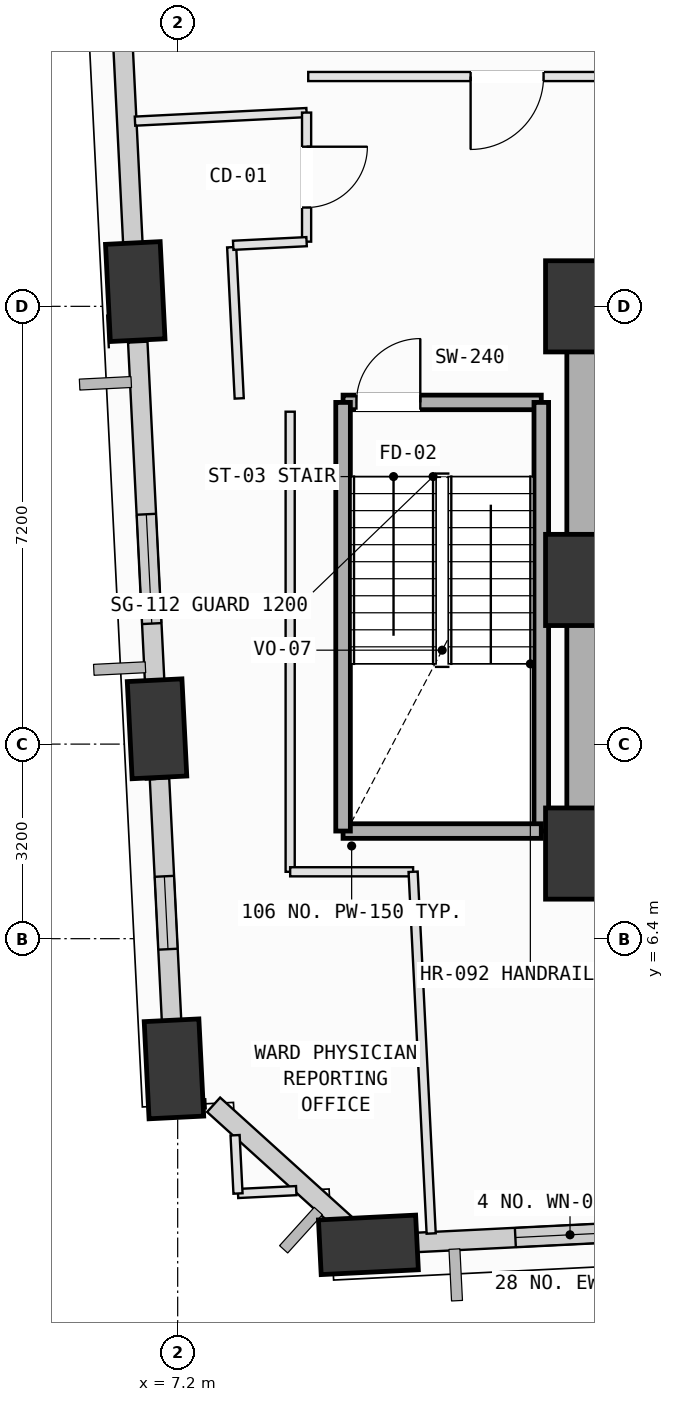
"""IFC4 building model, lengths in metres.
Left out: names, types, materials, properties, quantities, classifications, styles, units other than length and angle.
Written with IfcOpenShell. Run it as: python <this file> out.ifc"""

import sys

from ifc_helpers import new_model, si_unit, direction, frame, frame_2d, origin, origin_2d, place, context, subcontext, project, spatial, rectangle, extrude, element, fill, save


model = new_model("IFC4")
c1 = context("Model", 3, precision=1e-05, world=origin(), true_north=direction((0.0, 1.0)))
c2 = subcontext(c1, "Body", "Model", "MODEL_VIEW")
j1 = project(units=[si_unit("LENGTHUNIT", "METRE"), si_unit("PLANEANGLEUNIT", "RADIAN")], contexts=[c1])
p1 = place(None, origin())
s1 = spatial("IfcSite", under=j1, at=p1, CompositionType="ELEMENT")
p2 = place(p1, origin())
s2 = spatial("IfcBuilding", under=s1, at=p2, CompositionType="ELEMENT")
p3 = place(p2, frame((0.0, 0.0, 35.0)))
s3 = spatial("IfcBuildingStorey", under=s2, at=p3, CompositionType="ELEMENT", Elevation=35.0)
for number, where, z_axis, x_axis in (
    (1, (14.0, 7.8, 0.0), (0.0, 0.0, 1.0), (1.0, 0.0, 0.0)),
    (2, (14.0, 12.3, 0.0), (0.0, 0.0, 1.0), (1.0, 0.0, 0.0)),
    (3, (14.0, 16.8, 0.0), (0.0, 0.0, 1.0), (1.0, 0.0, 0.0)),
):
    element("IfcColumn", number, at=place(p3, frame(where, z_axis=z_axis, x_axis=x_axis)), inside=s3, PredefinedType="COLUMN", context=c2, shape_type="SweptSolid", body=[
        extrude(rectangle(XDim=1.5, YDim=1.5, at=origin_2d()), origin(), (0.0, 0.0, 1.0), 4.0),
    ])
p4 = place(p3, frame((10.337, 1.364, 0.002), z_axis=(0.097018175164, -0.094778828638, 0.990759530527), x_axis=(0.662701179656, 0.748853569612, 0.00674372016)))
e4 = element("IfcColumn", 4, at=p4, inside=s3, PredefinedType="COLUMN", context=c2, shape_type="SweptSolid", body=[
    extrude(rectangle(XDim=1.6, YDim=0.9, at=origin_2d()), origin(), (0.0, 0.0, 1.0), 4.034),
])
p5 = place(p3, frame((6.502, 17.043, 0.002), z_axis=(0.032885474542, -0.111337353845, 0.993238410052), x_axis=(-0.328691117165, 0.937292914665, 0.11594887501)))
e5 = element("IfcColumn", 5, at=p5, inside=s3, PredefinedType="COLUMN", context=c2, shape_type="SweptSolid", body=[
    extrude(rectangle(XDim=1.6, YDim=0.9, at=origin_2d()), origin(), (0.0, 0.0, 1.0), 4.024),
])
p6 = place(p3, frame((6.86, 9.852, 0.002), z_axis=(0.062358210805, -0.109445023046, 0.992034898819), x_axis=(-0.533701082068, 0.836262890195, 0.125807525543)))
e6 = element("IfcColumn", 6, at=p6, inside=s3, PredefinedType="COLUMN", context=c2, shape_type="SweptSolid", body=[
    extrude(rectangle(XDim=1.6, YDim=0.9, at=origin_2d()), origin(), (0.0, 0.0, 1.0), 4.029),
])
p7 = place(p3, frame((7.139, 4.259, 0.002), z_axis=(0.085253947103, -0.107943961413, 0.990494758036), x_axis=(-0.652169766377, 0.745520781844, 0.13738034671)))
e7 = element("IfcColumn", 7, at=p7, inside=s3, PredefinedType="COLUMN", context=c2, shape_type="SweptSolid", body=[
    extrude(rectangle(XDim=1.6, YDim=0.9, at=origin_2d()), origin(), (0.0, 0.0, 1.0), 4.035),
])
p8 = place(p3, frame((17.122, 1.702, 0.0), z_axis=(0.0, 0.0, 1.0), x_axis=(-0.998763010787, -0.049723719528, 0.0)))
e8 = element("IfcWall", 8, at=p8, inside=s3, PredefinedType="SOLIDWALL", context=c2, shape_type="SweptSolid", body=[
    extrude(rectangle(XDim=6.034, YDim=0.32, at=frame_2d((3.017, 0.0))), origin(), (0.0, 0.0, 1.0), 3.165),
])
p9 = place(p8, frame((2.574, 0.0, 0.75)))
e9 = element("IfcOpeningElement", 9, at=p9, cuts=e8, PredefinedType="OPENING", context=c2, shape_type="SweptSolid", body=[
    extrude(rectangle(XDim=1.8, YDim=2.05, at=frame_2d((0.9, 1.025))), frame((0.0, 0.17, 0.0), z_axis=(0.0, -1.0, 0.0), x_axis=(1.0, 0.0, 0.0)), (0.0, 0.0, 1.0), 0.34),
])
p10 = place(p3, frame((6.483, 17.421, 0.0), z_axis=(0.0, 0.0, 1.0), x_axis=(-0.049743098397, 0.998762045816, 0.0)))
e10 = element("IfcWall", 10, at=p10, inside=s3, PredefinedType="SOLIDWALL", context=c2, shape_type="SweptSolid", body=[
    extrude(rectangle(XDim=7.136, YDim=0.32, at=frame_2d((3.568, 0.0))), origin(), (0.0, 0.0, 1.0), 3.165),
])
p11 = place(p10, frame((4.264, 0.0, 0.75)))
e11 = element("IfcOpeningElement", 11, at=p11, cuts=e10, PredefinedType="OPENING", context=c2, shape_type="SweptSolid", body=[
    extrude(rectangle(XDim=1.4, YDim=1.85, at=frame_2d((0.7, 0.925))), frame((0.0, 0.17, 0.0), z_axis=(0.0, -1.0, 0.0), x_axis=(1.0, 0.0, 0.0)), (0.0, 0.0, 1.0), 0.34),
])
p12 = place(p3, frame((6.842, 10.222, 0.0), z_axis=(0.0, 0.0, 1.0), x_axis=(-0.049706150809, 0.998763885296, 0.0)))
e12 = element("IfcWall", 12, at=p12, inside=s3, PredefinedType="SOLIDWALL", context=c2, shape_type="SweptSolid", body=[
    extrude(rectangle(XDim=5.997, YDim=0.32, at=frame_2d((2.999, 0.0))), origin(), (0.0, 0.0, 1.0), 3.165),
])
p13 = place(p12, frame((1.362, 0.0, 0.75)))
e13 = element("IfcOpeningElement", 13, at=p13, cuts=e12, PredefinedType="OPENING", context=c2, shape_type="SweptSolid", body=[
    extrude(rectangle(XDim=1.8, YDim=2.05, at=frame_2d((0.9, 1.025))), frame((0.0, 0.17, 0.0), z_axis=(0.0, -1.0, 0.0), x_axis=(1.0, 0.0, 0.0)), (0.0, 0.0, 1.0), 0.34),
])
p14 = place(p3, frame((7.121, 4.618, 0.0), z_axis=(0.0, 0.0, 1.0), x_axis=(-0.04969774224, 0.998764303735, 0.0)))
e14 = element("IfcWall", 14, at=p14, inside=s3, PredefinedType="SOLIDWALL", context=c2, shape_type="SweptSolid", body=[
    extrude(rectangle(XDim=4.416, YDim=0.32, at=frame_2d((2.208, 0.0))), origin(), (0.0, 0.0, 1.0), 3.165),
])
p15 = place(p14, frame((1.611, 0.0, 0.75)))
e15 = element("IfcOpeningElement", 15, at=p15, cuts=e14, PredefinedType="OPENING", context=c2, shape_type="SweptSolid", body=[
    extrude(rectangle(XDim=1.2, YDim=1.75, at=frame_2d((0.6, 0.875))), frame((0.0, 0.17, 0.0), z_axis=(0.0, -1.0, 0.0), x_axis=(1.0, 0.0, 0.0)), (0.0, 0.0, 1.0), 0.34),
])
p16 = place(p3, frame((10.089, 1.589, 0.0), z_axis=(0.0, 0.0, 1.0), x_axis=(-0.741367790542, 0.67109894885, 0.0)))
e16 = element("IfcWall", 16, at=p16, inside=s3, PredefinedType="SOLIDWALL", context=c2, shape_type="SweptSolid", body=[
    extrude(rectangle(XDim=3.099, YDim=0.32, at=frame_2d((1.55, 0.0))), origin(), (0.0, 0.0, 1.0), 3.165),
])
p17 = place(p3, frame((9.92, 15.22, 0.0), z_axis=(0.0, 0.0, 1.0), x_axis=(1.0, 0.0, 0.0)))
e17 = element("IfcWall", 17, at=p17, inside=s3, PredefinedType="SOLIDWALL", context=c2, shape_type="SweptSolid", body=[
    extrude(rectangle(XDim=3.26, YDim=0.24, at=frame_2d((1.63, 0.0))), origin(), (0.0, 0.0, 1.0), 3.78),
])
p18 = place(p17, frame((0.22, 0.0, 0.0)))
e18 = element("IfcOpeningElement", 18, at=p18, cuts=e17, PredefinedType="OPENING", context=c2, shape_type="SweptSolid", body=[
    extrude(rectangle(XDim=1.05, YDim=2.15, at=frame_2d((0.525, 1.075))), frame((0.0, 0.13, 0.0), z_axis=(0.0, -1.0, 0.0), x_axis=(1.0, 0.0, 0.0)), (0.0, 0.0, 1.0), 0.26),
])
p19 = place(p3, frame((13.18, 15.22, 0.0), z_axis=(0.0, 0.0, 1.0), x_axis=(0.0, -1.0, 0.0)))
e19 = element("IfcWall", 19, at=p19, inside=s3, PredefinedType="SOLIDWALL", context=c2, shape_type="SweptSolid", body=[
    extrude(rectangle(XDim=7.05, YDim=0.24, at=frame_2d((3.525, 0.0))), origin(), (0.0, 0.0, 1.0), 3.78),
])
p20 = place(p3, frame((13.18, 8.17, 0.0), z_axis=(0.0, 0.0, 1.0), x_axis=(-1.0, 0.0, 0.0)))
e20 = element("IfcWall", 20, at=p20, inside=s3, PredefinedType="SOLIDWALL", context=c2, shape_type="SweptSolid", body=[
    extrude(rectangle(XDim=3.26, YDim=0.24, at=frame_2d((1.63, 0.0))), origin(), (0.0, 0.0, 1.0), 3.78),
])
p21 = place(p3, frame((9.92, 8.17, 0.0), z_axis=(0.0, 0.0, 1.0), x_axis=(0.0, 1.0, 0.0)))
e21 = element("IfcWall", 21, at=p21, inside=s3, PredefinedType="SOLIDWALL", context=c2, shape_type="SweptSolid", body=[
    extrude(rectangle(XDim=7.05, YDim=0.24, at=frame_2d((3.525, 0.0))), origin(), (0.0, 0.0, 1.0), 3.78),
])
p22 = place(p3, frame((14.0, 7.8, 0.0), z_axis=(0.0, 0.0, 1.0), x_axis=(1.0, 0.0, 0.0)))
e22 = element("IfcWall", 22, at=p22, inside=s3, PredefinedType="SHEAR", context=c2, shape_type="SweptSolid", body=[
    extrude(rectangle(XDim=10.8, YDim=0.8, at=frame_2d((5.4, 0.0))), origin(), (0.0, 0.0, 1.0), 3.78),
])
p23 = place(p3, frame((14.0, 16.8, 0.0), z_axis=(0.0, 0.0, 1.0), x_axis=(0.0, -1.0, 0.0)))
e23 = element("IfcWall", 23, at=p23, inside=s3, PredefinedType="SHEAR", context=c2, shape_type="SweptSolid", body=[
    extrude(rectangle(XDim=9.0, YDim=0.8, at=frame_2d((4.5, 0.0))), origin(), (0.0, 0.0, 1.0), 3.78),
])
p24 = place(p3, frame((9.05, 15.067, 0.0), z_axis=(0.0, 0.0, 1.0), x_axis=(0.0, -1.0, 0.0)))
e24 = element("IfcWall", 24, at=p24, inside=s3, PredefinedType="PARTITIONING", context=c2, shape_type="SweptSolid", body=[
    extrude(rectangle(XDim=7.567, YDim=0.15, at=frame_2d((3.783, 0.0))), origin(), (0.0, 0.0, 1.0), 3.78),
])
p25 = place(p3, frame((9.05, 7.5, 0.0), z_axis=(0.0, 0.0, 1.0), x_axis=(1.0, 0.0, 0.0)))
e25 = element("IfcWall", 25, at=p25, inside=s3, PredefinedType="PARTITIONING", context=c2, shape_type="SweptSolid", body=[
    extrude(rectangle(XDim=2.022, YDim=0.15, at=frame_2d((1.011, 0.0))), origin(), (0.0, 0.0, 1.0), 3.78),
])
p26 = place(p3, frame((11.072, 7.5, 0.0), z_axis=(0.0, 0.0, 1.0), x_axis=(0.049841534872, -0.998757138348, 0.0)))
e26 = element("IfcWall", 26, at=p26, inside=s3, PredefinedType="PARTITIONING", context=c2, shape_type="SweptSolid", body=[
    extrude(rectangle(XDim=5.956, YDim=0.15, at=frame_2d((2.978, 0.0))), origin(), (0.0, 0.0, 1.0), 3.78),
])
p27 = place(p3, frame((11.107, 1.172, 0.0), z_axis=(0.0, 0.0, 1.0), x_axis=(-0.998779948777, -0.049382323969, 0.0)))
e27 = element("IfcWall", 27, at=p27, inside=s3, PredefinedType="PARTITIONING", context=c2, shape_type="SweptSolid", body=[
    extrude(rectangle(XDim=1.36, YDim=0.15, at=frame_2d((0.68, 0.0))), origin(), (0.0, 0.0, 1.0), 3.165),
])
p28 = place(p3, frame((9.749, 1.105, 0.0), z_axis=(0.0, 0.0, 1.0), x_axis=(-0.050071060531, 0.998745657761, 0.0)))
e28 = element("IfcWall", 28, at=p28, inside=s3, PredefinedType="PARTITIONING", context=c2, shape_type="SweptSolid", body=[
    extrude(rectangle(XDim=0.639, YDim=0.15, at=frame_2d((0.319, 0.0))), origin(), (0.0, 0.0, 1.0), 3.78),
])
for number, where, z_axis, x_axis in (
    (29, (9.15, 2.256, 0.0), (0.0, 0.0, 1.0), (-0.999, -0.049, 0.0)),
    (30, (8.192, 2.209, 0.0), (0.0, 0.0, 1.0), (-0.05, 0.999, 0.0)),
):
    element("IfcWall", number, at=place(p3, frame(where, z_axis=z_axis, x_axis=x_axis)), inside=s3, PredefinedType="PARTITIONING", context=c2, shape_type="SweptSolid", body=[
        extrude(rectangle(XDim=0.959, YDim=0.15, at=frame_2d((0.479, 0.0))), origin(), (0.0, 0.0, 1.0), 3.78),
    ])
p29 = place(p3, frame((7.657, 3.684, 0.0), z_axis=(0.0, 0.0, 1.0), x_axis=(-0.998745657761, -0.050071060531, 0.0)))
e31 = element("IfcWall", 31, at=p29, inside=s3, PredefinedType="PARTITIONING", context=c2, shape_type="SweptSolid", body=[
    extrude(rectangle(XDim=0.639, YDim=0.15, at=frame_2d((0.319, 0.0))), origin(), (0.0, 0.0, 1.0), 3.78),
])
p30 = place(p3, frame((7.019, 3.652, 0.0), z_axis=(0.0, 0.0, 1.0), x_axis=(-0.050089793668, 0.998744718419, 0.0)))
e32 = element("IfcWall", 32, at=p30, inside=s3, PredefinedType="PARTITIONING", context=c2, shape_type="SweptSolid", body=[
    extrude(rectangle(XDim=0.96, YDim=0.15, at=frame_2d((0.48, 0.0))), origin(), (0.0, 0.0, 1.0), 3.78),
])
p31 = place(p3, frame((6.752, 9.022, 0.0), z_axis=(0.0, 0.0, 1.0), x_axis=(-0.050315055352, 0.998733395459, 0.0)))
e33 = element("IfcWall", 33, at=p31, inside=s3, PredefinedType="PARTITIONING", context=c2, shape_type="SweptSolid", body=[
    extrude(rectangle(XDim=1.194, YDim=0.15, at=frame_2d((0.597, 0.0))), origin(), (0.0, 0.0, 1.0), 3.165),
])
p32 = place(p3, frame((8.088, 17.773, 0.0), z_axis=(0.0, 0.0, 1.0), x_axis=(0.049805589203, -0.998758931517, 0.0)))
e34 = element("IfcWall", 34, at=p32, inside=s3, PredefinedType="PARTITIONING", context=c2, shape_type="SweptSolid", body=[
    extrude(rectangle(XDim=2.49, YDim=0.15, at=frame_2d((1.245, 0.0))), origin(), (0.0, 0.0, 1.0), 3.78),
])
p33 = place(p3, frame((6.498, 19.846, 0.0), z_axis=(0.0, 0.0, 1.0), x_axis=(0.998752123395, 0.049941926406, 0.0)))
e35 = element("IfcWall", 35, at=p33, inside=s3, PredefinedType="PARTITIONING", context=c2, shape_type="SweptSolid", body=[
    extrude(rectangle(XDim=2.825, YDim=0.15, at=frame_2d((1.413, 0.0))), origin(), (0.0, 0.0, 1.0), 3.78),
])
p34 = place(p3, frame((9.32, 19.987, 0.0), z_axis=(0.0, 0.0, 1.0), x_axis=(0.0, -1.0, 0.0)))
e36 = element("IfcWall", 36, at=p34, inside=s3, PredefinedType="PARTITIONING", context=c2, shape_type="SweptSolid", body=[
    extrude(rectangle(XDim=2.123, YDim=0.15, at=frame_2d((1.062, 0.0))), origin(), (0.0, 0.0, 1.0), 3.78),
])
p35 = place(p34, frame((0.562, 0.0, 0.0)))
e37 = element("IfcOpeningElement", 37, at=p35, cuts=e36, PredefinedType="OPENING", context=c2, shape_type="SweptSolid", body=[
    extrude(rectangle(XDim=1.0, YDim=2.12, at=frame_2d((0.5, 1.06))), frame((0.0, 0.085, 0.0), z_axis=(0.0, -1.0, 0.0), x_axis=(1.0, 0.0, 0.0)), (0.0, 0.0, 1.0), 0.17),
])
p36 = place(p3, frame((9.32, 17.864, 0.0), z_axis=(0.0, 0.0, 1.0), x_axis=(-0.998764400305, -0.049695801471, 0.0)))
e38 = element("IfcWall", 38, at=p36, inside=s3, PredefinedType="PARTITIONING", context=c2, shape_type="SweptSolid", body=[
    extrude(rectangle(XDim=1.208, YDim=0.15, at=frame_2d((0.604, 0.0))), origin(), (0.0, 0.0, 1.0), 3.78),
])
p37 = place(p3, frame((15.888, 20.58, 0.0), z_axis=(0.0, 0.0, 1.0), x_axis=(-1.0, 0.0, 0.0)))
e39 = element("IfcWall", 39, at=p37, inside=s3, PredefinedType="PARTITIONING", context=c2, shape_type="SweptSolid", body=[
    extrude(rectangle(XDim=6.541, YDim=0.15, at=frame_2d((3.271, 0.0))), origin(), (0.0, 0.0, 1.0), 3.78),
])
p38 = place(p37, frame((2.67, 0.0, 0.0)))
e40 = element("IfcOpeningElement", 40, at=p38, cuts=e39, PredefinedType="OPENING", context=c2, shape_type="SweptSolid", body=[
    extrude(rectangle(XDim=1.2, YDim=2.15, at=frame_2d((0.6, 1.075))), frame((0.0, 0.085, 0.0), z_axis=(0.0, -1.0, 0.0), x_axis=(1.0, 0.0, 0.0)), (0.0, 0.0, 1.0), 0.17),
])
p39 = place(p9, origin())
e41 = element("IfcWindow", 41, at=p39, inside=s3, PartitioningType="SINGLE_PANEL", PredefinedType="WINDOW", context=c2, shape_type="SweptSolid", body=[
    extrude(rectangle(XDim=1.8, YDim=2.05, at=frame_2d((0.9, 1.025))), frame((0.0, 0.03, 0.0), z_axis=(0.0, -1.0, 0.0), x_axis=(1.0, 0.0, 0.0)), (0.0, 0.0, 1.0), 0.06),
])
fill(e9, e41)
p40 = place(p13, origin())
e42 = element("IfcWindow", 42, at=p40, inside=s3, PartitioningType="SINGLE_PANEL", PredefinedType="WINDOW", context=c2, shape_type="SweptSolid", body=[
    extrude(rectangle(XDim=1.8, YDim=2.05, at=frame_2d((0.9, 1.025))), frame((0.0, 0.03, 0.0), z_axis=(0.0, -1.0, 0.0), x_axis=(1.0, 0.0, 0.0)), (0.0, 0.0, 1.0), 0.06),
])
fill(e13, e42)
p41 = place(p15, origin())
e43 = element("IfcWindow", 43, at=p41, inside=s3, PartitioningType="SINGLE_PANEL", PredefinedType="WINDOW", context=c2, shape_type="SweptSolid", body=[
    extrude(rectangle(XDim=1.2, YDim=1.75, at=frame_2d((0.6, 0.875))), frame((0.0, 0.03, 0.0), z_axis=(0.0, -1.0, 0.0), x_axis=(1.0, 0.0, 0.0)), (0.0, 0.0, 1.0), 0.06),
])
fill(e15, e43)
p42 = place(p18, origin())
e44 = element("IfcDoor", 44, at=p42, inside=s3, OperationType="SINGLE_SWING_RIGHT", PredefinedType="DOOR", context=c2, shape_type="SweptSolid", body=[
    extrude(rectangle(XDim=1.05, YDim=2.15, at=frame_2d((0.525, 1.075))), frame((0.0, 0.025, 0.0), z_axis=(0.0, -1.0, 0.0), x_axis=(1.0, 0.0, 0.0)), (0.0, 0.0, 1.0), 0.05),
])
fill(e18, e44)
p43 = place(p35, origin())
e45 = element("IfcDoor", 45, at=p43, inside=s3, OperationType="SINGLE_SWING_LEFT", PredefinedType="DOOR", context=c2, shape_type="SweptSolid", body=[
    extrude(rectangle(XDim=1.0, YDim=2.12, at=frame_2d((0.5, 1.06))), frame((0.0, 0.025, 0.0), z_axis=(0.0, -1.0, 0.0), x_axis=(1.0, 0.0, 0.0)), (0.0, 0.0, 1.0), 0.05),
])
fill(e37, e45)
p44 = place(p38, origin())
e46 = element("IfcDoor", 46, at=p44, inside=s3, OperationType="SINGLE_SWING_RIGHT", PredefinedType="DOOR", context=c2, shape_type="SweptSolid", body=[
    extrude(rectangle(XDim=1.2, YDim=2.15, at=frame_2d((0.6, 1.075))), frame((0.0, 0.025, 0.0), z_axis=(0.0, -1.0, 0.0), x_axis=(1.0, 0.0, 0.0)), (0.0, 0.0, 1.0), 0.05),
])
fill(e40, e46)
save(model, sys.argv[1])
